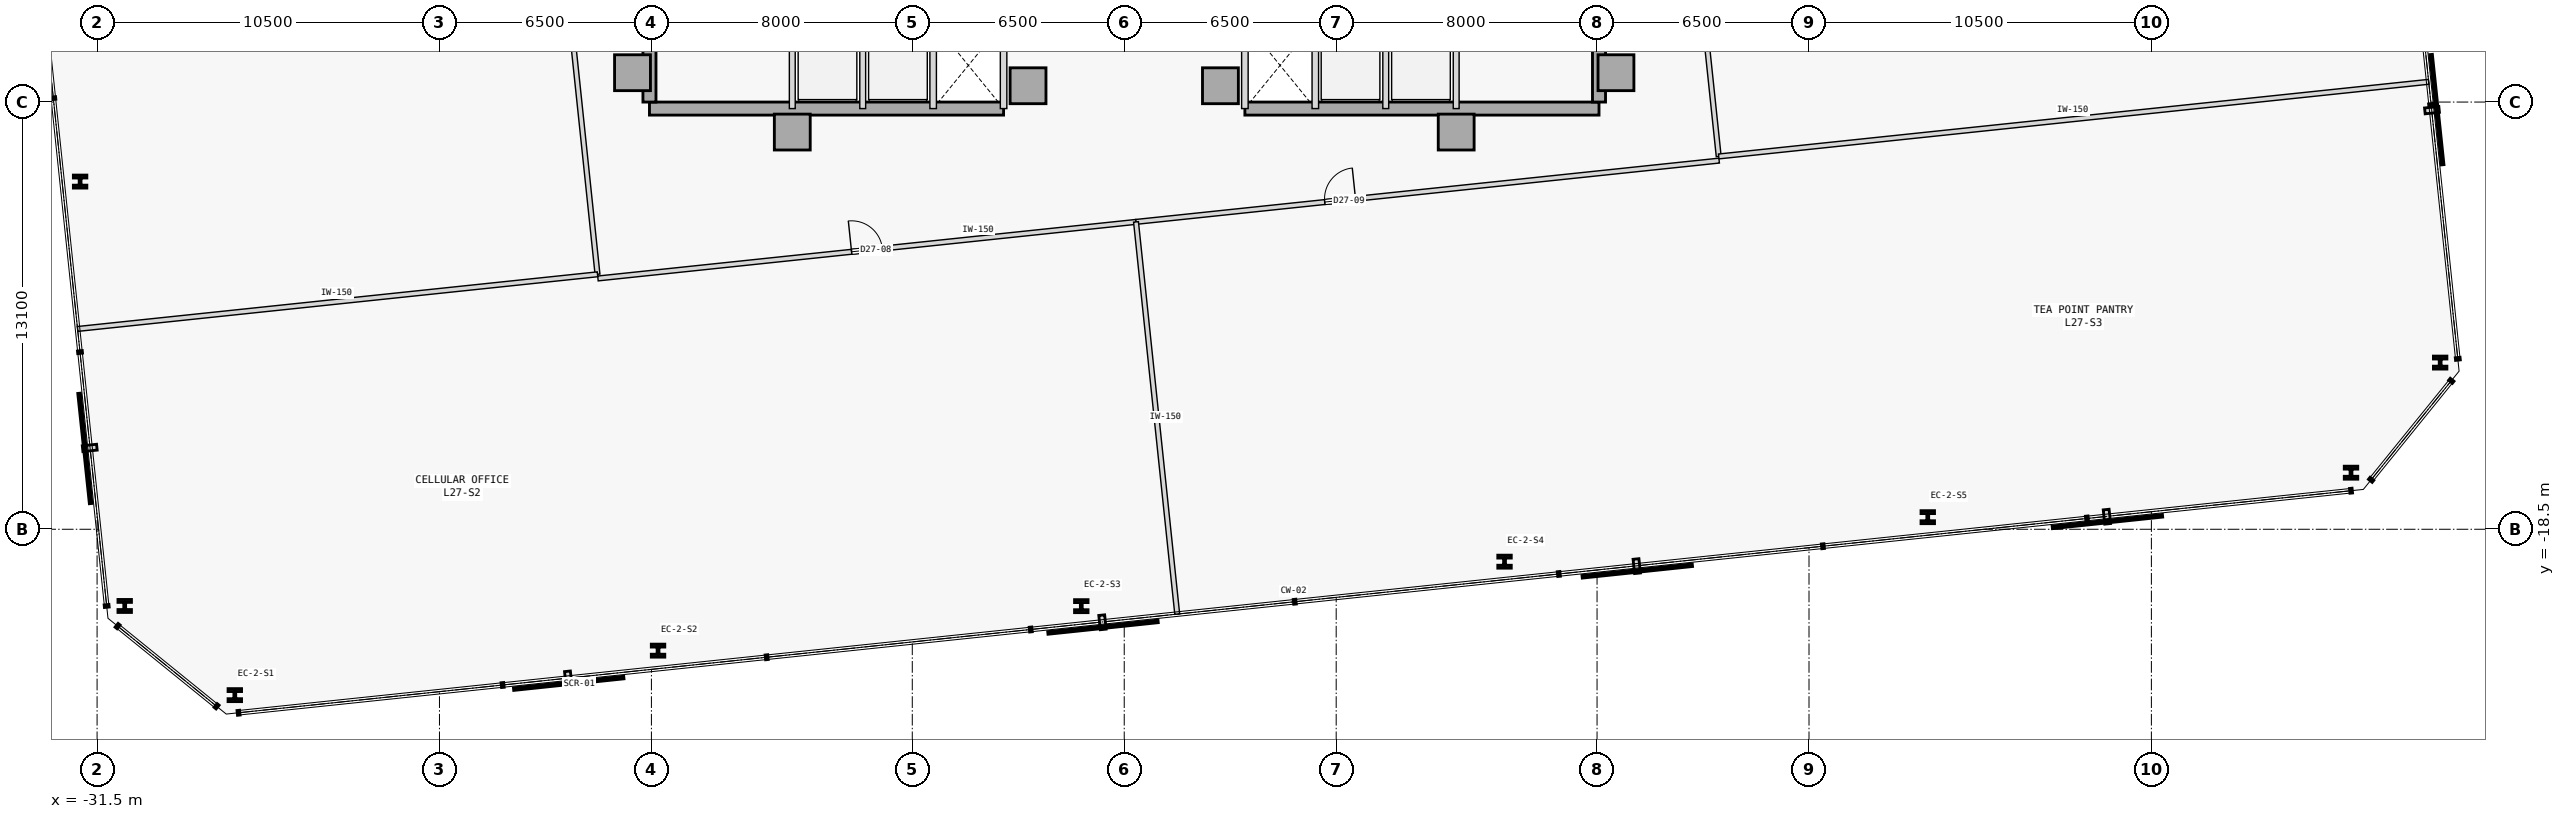
"""IFC4 building model, lengths in metres.
Left out: names, types, materials, properties, quantities, classifications, styles, units other than length and angle.
Written with IfcOpenShell. Run it as: python <this file> out.ifc"""

import sys

from ifc_helpers import new_model, si_unit, direction, frame, frame_2d, origin, origin_2d, place, context, subcontext, project, spatial, rectangle, i_section, extrude, element, fill, save


model = new_model("IFC4")
c1 = context("Model", 3, precision=1e-05, world=origin(), true_north=direction((0.0, 1.0)))
c2 = subcontext(c1, "Body", "Model", "MODEL_VIEW")
j1 = project(units=[si_unit("LENGTHUNIT", "METRE"), si_unit("PLANEANGLEUNIT", "RADIAN")], contexts=[c1])
p1 = place(None, origin())
s1 = spatial("IfcSite", under=j1, at=p1, CompositionType="ELEMENT")
p2 = place(p1, origin())
s2 = spatial("IfcBuilding", under=s1, at=p2, CompositionType="ELEMENT")
p3 = place(p2, frame((0.0, 0.0, 109.6)))
s3 = spatial("IfcBuildingStorey", under=s2, at=p3, CompositionType="ELEMENT", Elevation=109.6)
for number, where, z_axis, x_axis in (
    (1, (-15.08, -4.5, 0.0), (0.0, 0.0, 1.0), (1.0, 0.0, 0.0)),
    (2, (-10.18, -6.32, 0.0), (0.0, 0.0, 1.0), (1.0, 0.0, 0.0)),
    (3, (-2.95, -4.9, 0.0), (0.0, 0.0, 1.0), (1.0, 0.0, 0.0)),
    (4, (15.08, -4.5, 0.0), (0.0, 0.0, 1.0), (1.0, 0.0, 0.0)),
    (5, (10.18, -6.32, 0.0), (0.0, 0.0, 1.0), (1.0, 0.0, 0.0)),
    (6, (2.95, -4.9, 0.0), (0.0, 0.0, 1.0), (1.0, 0.0, 0.0)),
):
    element("IfcColumn", number, at=place(p3, frame(where, z_axis=z_axis, x_axis=x_axis)), inside=s3, PredefinedType="COLUMN", context=c2, shape_type="SweptSolid", body=[
        extrude(rectangle(XDim=1.1, YDim=1.1, at=origin_2d()), origin(), (0.0, 0.0, 1.0), 3.7),
    ])
p4 = place(p3, frame((-14.56, -5.6, 0.0), z_axis=(0.0, 0.0, 1.0), x_axis=(1.0, 0.0, 0.0)))
e7 = element("IfcWall", 7, at=p4, inside=s3, PredefinedType="SHEAR", context=c2, shape_type="SweptSolid", body=[
    extrude(rectangle(XDim=10.86, YDim=0.4, at=frame_2d((5.43, 0.0))), origin(), (0.0, 0.0, 1.0), 3.475),
])
p5 = place(p3, frame((-14.56, -5.4, 0.0), z_axis=(0.0, 0.0, 1.0), x_axis=(0.0, 1.0, 0.0)))
e8 = element("IfcWall", 8, at=p5, inside=s3, PredefinedType="SHEAR", context=c2, shape_type="SweptSolid", body=[
    extrude(rectangle(XDim=10.8, YDim=0.4, at=frame_2d((5.4, 0.0))), origin(), (0.0, 0.0, 1.0), 3.475),
])
p6 = place(p3, frame((3.7, -5.6, 0.0), z_axis=(0.0, 0.0, 1.0), x_axis=(1.0, 0.0, 0.0)))
e9 = element("IfcWall", 9, at=p6, inside=s3, PredefinedType="SHEAR", context=c2, shape_type="SweptSolid", body=[
    extrude(rectangle(XDim=10.86, YDim=0.4, at=frame_2d((5.43, 0.0))), origin(), (0.0, 0.0, 1.0), 3.475),
])
p7 = place(p3, frame((14.56, -5.4, 0.0), z_axis=(0.0, 0.0, 1.0), x_axis=(0.0, 1.0, 0.0)))
e10 = element("IfcWall", 10, at=p7, inside=s3, PredefinedType="SHEAR", context=c2, shape_type="SweptSolid", body=[
    extrude(rectangle(XDim=10.8, YDim=0.4, at=frame_2d((5.4, 0.0))), origin(), (0.0, 0.0, 1.0), 3.475),
])
for number, where, z_axis, x_axis in (
    (11, (-27.276, -23.586, 0.0), (0.0, 0.0, 1.0), (1.0, 0.0, 0.0)),
    (12, (-14.297, -22.222, 0.0), (0.0, 0.0, 1.0), (1.0, 0.0, 0.0)),
    (13, (-1.317, -20.858, 0.0), (0.0, 0.0, 1.0), (1.0, 0.0, 0.0)),
    (14, (11.663, -19.494, 0.0), (0.0, 0.0, 1.0), (1.0, 0.0, 0.0)),
    (15, (24.642, -18.129, 0.0), (0.0, 0.0, 1.0), (1.0, 0.0, 0.0)),
    (16, (37.622, -16.765, 0.0), (0.0, 0.0, 1.0), (1.0, 0.0, 0.0)),
    (17, (40.356, -13.389, 0.0), (0.0, 0.0, 1.0), (1.0, 0.0, 0.0)),
    (18, (-32.021, -7.838, 0.0), (0.0, 0.0, 1.0), (1.0, 0.0, 0.0)),
    (19, (-30.653, -20.852, 0.0), (0.0, 0.0, 1.0), (1.0, 0.0, 0.0)),
):
    element("IfcColumn", number, at=place(p3, frame(where, z_axis=z_axis, x_axis=x_axis)), inside=s3, PredefinedType="COLUMN", context=c2, shape_type="SweptSolid", body=[
        extrude(i_section(OverallWidth=0.413, OverallDepth=0.398, WebThickness=0.056, FlangeThickness=0.089, FilletRadius=0.015, at=origin_2d()), origin(), (0.0, 0.0, 1.0), 3.7),
    ])
for number, where, z_axis, x_axis in (
    (20, (-3.7, -5.6, 0.0), (0.0, 0.0, 1.0), (0.0, 1.0, 0.0)),
    (21, (-5.86, -5.6, 0.0), (0.0, 0.0, 1.0), (0.0, 1.0, 0.0)),
):
    element("IfcWall", number, at=place(p3, frame(where, z_axis=z_axis, x_axis=x_axis)), inside=s3, PredefinedType="STANDARD", context=c2, shape_type="SweptSolid", body=[
        extrude(rectangle(XDim=2.65, YDim=0.2, at=frame_2d((1.325, 0.0))), origin(), (0.0, 0.0, 1.0), 3.475),
    ])
for number, where, z_axis, x_axis in (
    (22, (-10.18, -5.6, 0.0), (0.0, 0.0, 1.0), (0.0, 1.0, 0.0)),
    (23, (-8.02, -5.6, 0.0), (0.0, 0.0, 1.0), (0.0, 1.0, 0.0)),
):
    element("IfcWall", number, at=place(p3, frame(where, z_axis=z_axis, x_axis=x_axis)), inside=s3, PredefinedType="STANDARD", context=c2, shape_type="SweptSolid", body=[
        extrude(rectangle(XDim=2.65, YDim=0.18, at=frame_2d((1.325, 0.0))), origin(), (0.0, 0.0, 1.0), 3.475),
    ])
for number, where, z_axis, x_axis in (
    (24, (3.7, -5.6, 0.0), (0.0, 0.0, 1.0), (0.0, 1.0, 0.0)),
    (25, (5.86, -5.6, 0.0), (0.0, 0.0, 1.0), (0.0, 1.0, 0.0)),
):
    element("IfcWall", number, at=place(p3, frame(where, z_axis=z_axis, x_axis=x_axis)), inside=s3, PredefinedType="STANDARD", context=c2, shape_type="SweptSolid", body=[
        extrude(rectangle(XDim=2.65, YDim=0.2, at=frame_2d((1.325, 0.0))), origin(), (0.0, 0.0, 1.0), 3.475),
    ])
for number, where, z_axis, x_axis in (
    (26, (10.18, -5.6, 0.0), (0.0, 0.0, 1.0), (0.0, 1.0, 0.0)),
    (27, (8.02, -5.6, 0.0), (0.0, 0.0, 1.0), (0.0, 1.0, 0.0)),
):
    element("IfcWall", number, at=place(p3, frame(where, z_axis=z_axis, x_axis=x_axis)), inside=s3, PredefinedType="STANDARD", context=c2, shape_type="SweptSolid", body=[
        extrude(rectangle(XDim=2.65, YDim=0.18, at=frame_2d((1.325, 0.0))), origin(), (0.0, 0.0, 1.0), 3.475),
    ])
p8 = place(p3, frame((-16.14, -10.809, 0.0), z_axis=(0.0, 0.0, 1.0), x_axis=(0.994521566569, 0.104531591539, 0.0)))
e28 = element("IfcWall", 28, at=p8, inside=s3, PredefinedType="PARTITIONING", context=c2, shape_type="SweptSolid", body=[
    extrude(rectangle(XDim=16.592, YDim=0.15, at=frame_2d((8.296, 0.0))), origin(), (0.0, 0.0, 1.0), 3.475),
])
p9 = place(p8, frame((7.821, 0.0, 0.0)))
e29 = element("IfcOpeningElement", 29, at=p9, cuts=e28, PredefinedType="OPENING", context=c2, shape_type="SweptSolid", body=[
    extrude(rectangle(XDim=0.95, YDim=2.15, at=frame_2d((0.475, 1.075))), frame((0.0, 0.085, 0.0), z_axis=(0.0, -1.0, 0.0), x_axis=(1.0, 0.0, 0.0)), (0.0, 0.0, 1.0), 0.17),
])
p10 = place(p3, frame((0.361, -9.075, 0.0), z_axis=(0.0, 0.0, 1.0), x_axis=(0.994523293042, 0.104515164432, 0.0)))
e30 = element("IfcWall", 30, at=p10, inside=s3, PredefinedType="PARTITIONING", context=c2, shape_type="SweptSolid", body=[
    extrude(rectangle(XDim=17.982, YDim=0.15, at=frame_2d((8.991, 0.0))), origin(), (0.0, 0.0, 1.0), 3.475),
])
p11 = place(p10, frame((5.819, 0.0, 0.0)))
e31 = element("IfcOpeningElement", 31, at=p11, cuts=e30, PredefinedType="OPENING", context=c2, shape_type="SweptSolid", body=[
    extrude(rectangle(XDim=0.95, YDim=2.15, at=frame_2d((0.475, 1.075))), frame((0.0, 0.085, 0.0), z_axis=(0.0, -1.0, 0.0), x_axis=(1.0, 0.0, 0.0)), (0.0, 0.0, 1.0), 0.17),
])
p12 = place(p3, frame((-16.153, -10.682, 0.0), z_axis=(0.0, 0.0, 1.0), x_axis=(-0.104527614588, 0.994521984568, 0.0)))
e32 = element("IfcWall", 32, at=p12, inside=s3, PredefinedType="PARTITIONING", context=c2, shape_type="SweptSolid", body=[
    extrude(rectangle(XDim=17.87, YDim=0.15, at=frame_2d((8.935, 0.0))), origin(), (0.0, 0.0, 1.0), 3.475),
])
p13 = place(p12, frame((8.46, 0.0, 0.0)))
e33 = element("IfcOpeningElement", 33, at=p13, cuts=e32, PredefinedType="OPENING", context=c2, shape_type="SweptSolid", body=[
    extrude(rectangle(XDim=0.95, YDim=2.15, at=frame_2d((0.475, 1.075))), frame((0.0, 0.085, 0.0), z_axis=(0.0, -1.0, 0.0), x_axis=(1.0, 0.0, 0.0)), (0.0, 0.0, 1.0), 0.17),
])
p14 = place(p3, frame((18.231, -7.068, 0.0), z_axis=(0.0, 0.0, 1.0), x_axis=(-0.104529034836, 0.994521835294, 0.0)))
e34 = element("IfcWall", 34, at=p14, inside=s3, PredefinedType="PARTITIONING", context=c2, shape_type="SweptSolid", body=[
    extrude(rectangle(XDim=17.87, YDim=0.15, at=frame_2d((8.935, 0.0))), origin(), (0.0, 0.0, 1.0), 3.475),
])
p15 = place(p14, frame((8.46, 0.0, 0.0)))
e35 = element("IfcOpeningElement", 35, at=p15, cuts=e34, PredefinedType="OPENING", context=c2, shape_type="SweptSolid", body=[
    extrude(rectangle(XDim=0.95, YDim=2.15, at=frame_2d((0.475, 1.075))), frame((0.0, 0.085, 0.0), z_axis=(0.0, -1.0, 0.0), x_axis=(1.0, 0.0, 0.0)), (0.0, 0.0, 1.0), 0.17),
])
p16 = place(p3, frame((1.625, -21.102, 0.0), z_axis=(0.0, 0.0, 1.0), x_axis=(-0.104515587229, 0.99452324861, 0.0)))
e36 = element("IfcWall", 36, at=p16, inside=s3, PredefinedType="PARTITIONING", context=c2, shape_type="SweptSolid", body=[
    extrude(rectangle(XDim=12.093, YDim=0.15, at=frame_2d((6.046, 0.0))), origin(), (0.0, 0.0, 1.0), 3.475),
])
p17 = place(p3, frame((-32.099, -12.358, 0.0), z_axis=(0.0, 0.0, 1.0), x_axis=(0.994522794159, 0.104519911488, 0.0)))
e37 = element("IfcWall", 37, at=p17, inside=s3, PredefinedType="PARTITIONING", context=c2, shape_type="SweptSolid", body=[
    extrude(rectangle(XDim=16.033, YDim=0.15, at=frame_2d((8.017, 0.0))), origin(), (0.0, 0.0, 1.0), 3.475),
])
p18 = place(p3, frame((18.231, -7.068, 0.0), z_axis=(0.0, 0.0, 1.0), x_axis=(0.994521328491, 0.104533856601, 0.0)))
e38 = element("IfcWall", 38, at=p18, inside=s3, PredefinedType="PARTITIONING", context=c2, shape_type="SweptSolid", body=[
    extrude(rectangle(XDim=21.893, YDim=0.15, at=frame_2d((10.947, 0.0))), origin(), (0.0, 0.0, 1.0), 3.475),
])
p19 = place(p9, origin())
e39 = element("IfcDoor", 39, at=p19, inside=s3, OperationType="SINGLE_SWING_LEFT", PredefinedType="DOOR", context=c2, shape_type="SweptSolid", body=[
    extrude(rectangle(XDim=0.95, YDim=2.15, at=frame_2d((0.475, 1.075))), frame((0.0, 0.025, 0.0), z_axis=(0.0, -1.0, 0.0), x_axis=(1.0, 0.0, 0.0)), (0.0, 0.0, 1.0), 0.05),
])
fill(e29, e39)
p20 = place(p11, origin())
e40 = element("IfcDoor", 40, at=p20, inside=s3, OperationType="SINGLE_SWING_RIGHT", PredefinedType="DOOR", context=c2, shape_type="SweptSolid", body=[
    extrude(rectangle(XDim=0.95, YDim=2.15, at=frame_2d((0.475, 1.075))), frame((0.0, 0.025, 0.0), z_axis=(0.0, -1.0, 0.0), x_axis=(1.0, 0.0, 0.0)), (0.0, 0.0, 1.0), 0.05),
])
fill(e31, e40)
save(model, sys.argv[1])
